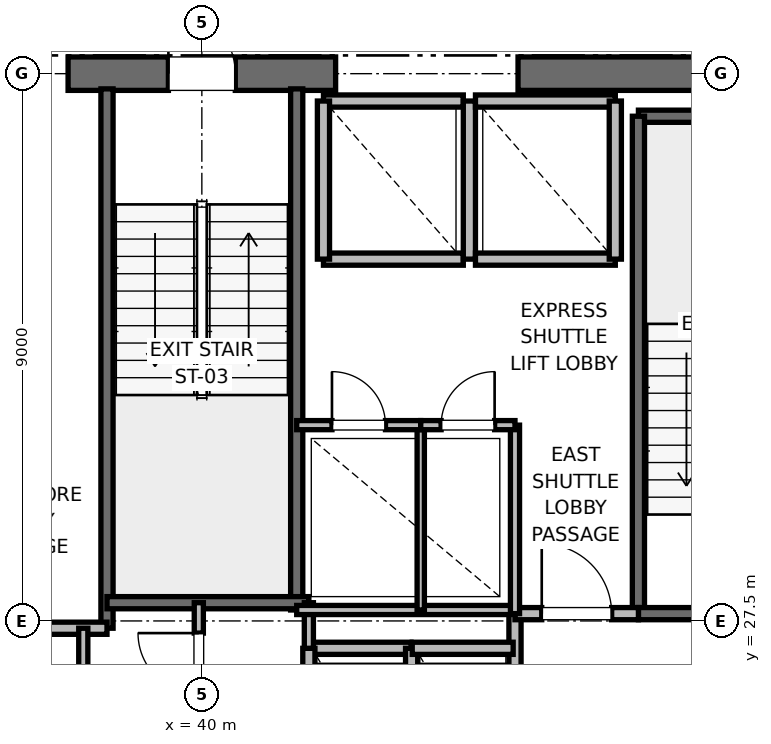
"""IFC4 building model, lengths in metres.
Left out: names, types, materials, properties, quantities, classifications, styles, units other than length and angle.
Written with IfcOpenShell. Run it as: python <this file> out.ifc"""

import sys

from ifc_helpers import new_model, si_unit, direction, frame, frame_2d, origin, place, context, subcontext, project, spatial, rectangle, extrude, element, fill, save


model = new_model("IFC4")
c1 = context("Model", 3, precision=1e-05, world=origin(), true_north=direction((0.0, 1.0)))
c2 = subcontext(c1, "Body", "Model", "MODEL_VIEW")
j1 = project(units=[si_unit("LENGTHUNIT", "METRE"), si_unit("PLANEANGLEUNIT", "RADIAN")], contexts=[c1])
p1 = place(None, origin())
s1 = spatial("IfcSite", under=j1, at=p1, CompositionType="ELEMENT")
p2 = place(p1, origin())
s2 = spatial("IfcBuilding", under=s1, at=p2, CompositionType="ELEMENT")
p3 = place(p2, frame((0.0, 0.0, 221.2)))
s3 = spatial("IfcBuildingStorey", under=s2, at=p3, CompositionType="ELEMENT", Elevation=221.2)
p4 = place(p3, frame((37.8, 36.5, 0.0), z_axis=(0.0, 0.0, 1.0), x_axis=(1.0, 0.0, 0.0)))
e1 = element("IfcWall", 1, at=p4, inside=s3, PredefinedType="SHEAR", context=c2, shape_type="SweptSolid", body=[
    extrude(rectangle(XDim=4.4, YDim=0.55, at=frame_2d((2.2, 0.0))), origin(), (0.0, 0.0, 1.0), 3.775),
])
p5 = place(p4, frame((1.65, 0.0, 0.0)))
e2 = element("IfcOpeningElement", 2, at=p5, cuts=e1, PredefinedType="OPENING", context=c2, shape_type="SweptSolid", body=[
    extrude(rectangle(XDim=1.1, YDim=2.15, at=frame_2d((0.55, 1.075))), frame((0.0, 0.275, 0.0), z_axis=(0.0, -1.0, 0.0), x_axis=(1.0, 0.0, 0.0)), (0.0, 0.0, 1.0), 0.55),
])
p6 = place(p3, frame((45.2, 36.5, 0.0), z_axis=(0.0, 0.0, 1.0), x_axis=(1.0, 0.0, 0.0)))
e3 = element("IfcWall", 3, at=p6, inside=s3, PredefinedType="SHEAR", context=c2, shape_type="SweptSolid", body=[
    extrude(rectangle(XDim=5.8, YDim=0.55, at=frame_2d((2.9, 0.0))), origin(), (0.0, 0.0, 1.0), 3.775),
])
p7 = place(p3, frame((47.18, 35.8, 0.0), z_axis=(0.0, 0.0, 1.0), x_axis=(1.0, 0.0, 0.0)))
e4 = element("IfcWall", 4, at=p7, inside=s3, PredefinedType="SOLIDWALL", context=c2, shape_type="SweptSolid", body=[
    extrude(rectangle(XDim=3.12, YDim=0.2, at=frame_2d((1.56, 0.0))), origin(), (0.0, 0.0, 1.0), 3.775),
])
p8 = place(p3, frame((47.18, 27.62, 0.0), z_axis=(0.0, 0.0, 1.0), x_axis=(0.0, 1.0, 0.0)))
e5 = element("IfcWall", 5, at=p8, inside=s3, PredefinedType="SOLIDWALL", context=c2, shape_type="SweptSolid", body=[
    extrude(rectangle(XDim=8.18, YDim=0.2, at=frame_2d((4.09, 0.0))), origin(), (0.0, 0.0, 1.0), 3.775),
])
p9 = place(p3, frame((47.18, 27.62, 0.0), z_axis=(0.0, 0.0, 1.0), x_axis=(1.0, 0.0, 0.0)))
e6 = element("IfcWall", 6, at=p9, inside=s3, PredefinedType="SOLIDWALL", context=c2, shape_type="SweptSolid", body=[
    extrude(rectangle(XDim=3.12, YDim=0.2, at=frame_2d((1.56, 0.0))), origin(), (0.0, 0.0, 1.0), 3.775),
])
p10 = place(p9, frame((1.01, 0.0, 0.0)))
e7 = element("IfcOpeningElement", 7, at=p10, cuts=e6, PredefinedType="OPENING", context=c2, shape_type="SweptSolid", body=[
    extrude(rectangle(XDim=1.1, YDim=2.15, at=frame_2d((0.55, 1.075))), frame((0.0, 0.1, 0.0), z_axis=(0.0, -1.0, 0.0), x_axis=(1.0, 0.0, 0.0)), (0.0, 0.0, 1.0), 0.2),
])
p11 = place(p3, frame((38.44, 27.38, 0.0), z_axis=(0.0, 0.0, 1.0), x_axis=(0.0, 1.0, 0.0)))
e8 = element("IfcWall", 8, at=p11, inside=s3, PredefinedType="SOLIDWALL", context=c2, shape_type="SweptSolid", body=[
    extrude(rectangle(XDim=8.87, YDim=0.2, at=frame_2d((4.435, 0.0))), origin(), (0.0, 0.0, 1.0), 3.775),
])
p12 = place(p3, frame((41.56, 27.68, 0.0), z_axis=(0.0, 0.0, 1.0), x_axis=(0.0, 1.0, 0.0)))
e9 = element("IfcWall", 9, at=p12, inside=s3, PredefinedType="SOLIDWALL", context=c2, shape_type="SweptSolid", body=[
    extrude(rectangle(XDim=8.57, YDim=0.2, at=frame_2d((4.285, 0.0))), origin(), (0.0, 0.0, 1.0), 3.775),
])
p13 = place(p3, frame((38.44, 27.8, 0.0), z_axis=(0.0, 0.0, 1.0), x_axis=(1.0, 0.0, 0.0)))
e10 = element("IfcWall", 10, at=p13, inside=s3, PredefinedType="SOLIDWALL", context=c2, shape_type="SweptSolid", body=[
    extrude(rectangle(XDim=3.32, YDim=0.2, at=frame_2d((1.66, 0.0))), origin(), (0.0, 0.0, 1.0), 3.775),
])
p14 = place(p3, frame((32.82, 27.38, 0.0), z_axis=(0.0, 0.0, 1.0), x_axis=(1.0, 0.0, 0.0)))
e11 = element("IfcWall", 11, at=p14, inside=s3, PredefinedType="PARTITIONING", context=c2, shape_type="SweptSolid", body=[
    extrude(rectangle(XDim=5.62, YDim=0.2, at=frame_2d((2.81, 0.0))), origin(), (0.0, 0.0, 1.0), 3.775),
])
p15 = place(p3, frame((45.15, 24.25, 0.0), z_axis=(0.0, 0.0, 1.0), x_axis=(0.0, 1.0, 0.0)))
e12 = element("IfcWall", 12, at=p15, inside=s3, PredefinedType="PARTITIONING", context=c2, shape_type="SweptSolid", body=[
    extrude(rectangle(XDim=3.37, YDim=0.2, at=frame_2d((1.685, 0.0))), origin(), (0.0, 0.0, 1.0), 3.775),
])
p16 = place(p3, frame((45.15, 27.62, 0.0), z_axis=(0.0, 0.0, 1.0), x_axis=(1.0, 0.0, 0.0)))
e13 = element("IfcWall", 13, at=p16, inside=s3, PredefinedType="PARTITIONING", context=c2, shape_type="SweptSolid", body=[
    extrude(rectangle(XDim=2.03, YDim=0.2, at=frame_2d((1.015, 0.0))), origin(), (0.0, 0.0, 1.0), 3.775),
])
p17 = place(p16, frame((0.44, 0.0, 0.0)))
e14 = element("IfcOpeningElement", 14, at=p17, cuts=e13, PredefinedType="OPENING", context=c2, shape_type="SweptSolid", body=[
    extrude(rectangle(XDim=1.15, YDim=2.2, at=frame_2d((0.575, 1.1))), frame((0.0, 0.1, 0.0), z_axis=(0.0, -1.0, 0.0), x_axis=(1.0, 0.0, 0.0)), (0.0, 0.0, 1.0), 0.2),
])
p18 = place(p3, frame((43.44, 27.05, 0.0), z_axis=(0.0, 0.0, 1.0), x_axis=(-1.0, 0.0, 0.0)))
e15 = element("IfcWall", 15, at=p18, inside=s3, PredefinedType="SOLIDWALL", context=c2, shape_type="SweptSolid", body=[
    extrude(rectangle(XDim=1.68, YDim=0.2, at=frame_2d((0.84, 0.0))), origin(), (0.0, 0.0, 1.0), 3.775),
])
for number, where, z_axis, x_axis in (
    (16, (41.76, 27.05, 0.0), (0.0, 0.0, 1.0), (0.0, -1.0, 0.0)),
    (17, (43.45, 24.45, 0.0), (0.0, 0.0, 1.0), (0.0, 1.0, 0.0)),
):
    element("IfcWall", number, at=place(p3, frame(where, z_axis=z_axis, x_axis=x_axis)), inside=s3, PredefinedType="SOLIDWALL", context=c2, shape_type="SweptSolid", body=[
        extrude(rectangle(XDim=2.6, YDim=0.2, at=frame_2d((1.3, 0.0))), origin(), (0.0, 0.0, 1.0), 3.775),
    ])
p19 = place(p3, frame((45.12, 27.05, 0.0), z_axis=(0.0, 0.0, 1.0), x_axis=(-1.0, 0.0, 0.0)))
e18 = element("IfcWall", 18, at=p19, inside=s3, PredefinedType="SOLIDWALL", context=c2, shape_type="SweptSolid", body=[
    extrude(rectangle(XDim=1.66, YDim=0.2, at=frame_2d((0.83, 0.0))), origin(), (0.0, 0.0, 1.0), 3.775),
])
p20 = place(p3, frame((42.0, 33.45, 0.0), z_axis=(0.0, 0.0, 1.0), x_axis=(1.0, 0.0, 0.0)))
e19 = element("IfcWall", 19, at=p20, inside=s3, PredefinedType="SOLIDWALL", context=c2, shape_type="SweptSolid", body=[
    extrude(rectangle(XDim=2.3, YDim=0.2, at=frame_2d((1.15, 0.0))), origin(), (0.0, 0.0, 1.0), 3.775),
])
p21 = place(p3, frame((44.3, 36.05, 0.0), z_axis=(0.0, 0.0, 1.0), x_axis=(-1.0, 0.0, 0.0)))
e20 = element("IfcWall", 20, at=p21, inside=s3, PredefinedType="SOLIDWALL", context=c2, shape_type="SweptSolid", body=[
    extrude(rectangle(XDim=2.3, YDim=0.2, at=frame_2d((1.15, 0.0))), origin(), (0.0, 0.0, 1.0), 2.755),
])
for number, where, z_axis, x_axis in (
    (21, (42.0, 36.05, 0.0), (0.0, 0.0, 1.0), (0.0, -1.0, 0.0)),
    (22, (44.4, 33.45, 0.0), (0.0, 0.0, 1.0), (0.0, 1.0, 0.0)),
):
    element("IfcWall", number, at=place(p3, frame(where, z_axis=z_axis, x_axis=x_axis)), inside=s3, PredefinedType="SOLIDWALL", context=c2, shape_type="SweptSolid", body=[
        extrude(rectangle(XDim=2.6, YDim=0.2, at=frame_2d((1.3, 0.0))), origin(), (0.0, 0.0, 1.0), 2.755),
    ])
p22 = place(p3, frame((44.5, 33.45, 0.0), z_axis=(0.0, 0.0, 1.0), x_axis=(1.0, 0.0, 0.0)))
e23 = element("IfcWall", 23, at=p22, inside=s3, PredefinedType="SOLIDWALL", context=c2, shape_type="SweptSolid", body=[
    extrude(rectangle(XDim=2.3, YDim=0.2, at=frame_2d((1.15, 0.0))), origin(), (0.0, 0.0, 1.0), 3.775),
])
p23 = place(p3, frame((46.8, 36.05, 0.0), z_axis=(0.0, 0.0, 1.0), x_axis=(-1.0, 0.0, 0.0)))
e24 = element("IfcWall", 24, at=p23, inside=s3, PredefinedType="SOLIDWALL", context=c2, shape_type="SweptSolid", body=[
    extrude(rectangle(XDim=2.3, YDim=0.2, at=frame_2d((1.15, 0.0))), origin(), (0.0, 0.0, 1.0), 2.755),
])
p24 = place(p3, frame((46.8, 33.45, 0.0), z_axis=(0.0, 0.0, 1.0), x_axis=(0.0, 1.0, 0.0)))
e25 = element("IfcWall", 25, at=p24, inside=s3, PredefinedType="SOLIDWALL", context=c2, shape_type="SweptSolid", body=[
    extrude(rectangle(XDim=2.6, YDim=0.2, at=frame_2d((1.3, 0.0))), origin(), (0.0, 0.0, 1.0), 3.775),
])
p25 = place(p3, frame((41.76, 27.05, 0.0), z_axis=(0.0, 0.0, 1.0), x_axis=(0.0, 1.0, 0.0)))
e26 = element("IfcWall", 26, at=p25, inside=s3, PredefinedType="PARTITIONING", context=c2, shape_type="SweptSolid", body=[
    extrude(rectangle(XDim=0.75, YDim=0.15, at=frame_2d((0.375, 0.0))), origin(), (0.0, 0.0, 1.0), 2.85),
])
p26 = place(p3, frame((39.95, 25.8, 0.0), z_axis=(0.0, 0.0, 1.0), x_axis=(0.0, 1.0, 0.0)))
e27 = element("IfcWall", 27, at=p26, inside=s3, PredefinedType="PARTITIONING", context=c2, shape_type="SweptSolid", body=[
    extrude(rectangle(XDim=2.0, YDim=0.15, at=frame_2d((1.0, 0.0))), origin(), (0.0, 0.0, 1.0), 2.85),
])
p27 = place(p26, frame((0.5, 0.0, 0.0)))
e28 = element("IfcOpeningElement", 28, at=p27, cuts=e27, PredefinedType="OPENING", context=c2, shape_type="SweptSolid", body=[
    extrude(rectangle(XDim=1.0, YDim=2.15, at=frame_2d((0.5, 1.075))), frame((0.0, 0.075, 0.0), z_axis=(0.0, -1.0, 0.0), x_axis=(1.0, 0.0, 0.0)), (0.0, 0.0, 1.0), 0.15),
])
p28 = place(p3, frame((38.05, 24.5, 0.0), z_axis=(0.0, 0.0, 1.0), x_axis=(0.0, 1.0, 0.0)))
e29 = element("IfcWall", 29, at=p28, inside=s3, PredefinedType="PARTITIONING", context=c2, shape_type="SweptSolid", body=[
    extrude(rectangle(XDim=2.88, YDim=0.15, at=frame_2d((1.44, 0.0))), origin(), (0.0, 0.0, 1.0), 2.85),
])
p29 = place(p28, frame((0.94, 0.0, 0.0)))
e30 = element("IfcOpeningElement", 30, at=p29, cuts=e29, PredefinedType="OPENING", context=c2, shape_type="SweptSolid", body=[
    extrude(rectangle(XDim=1.0, YDim=2.15, at=frame_2d((0.5, 1.075))), frame((0.0, 0.075, 0.0), z_axis=(0.0, -1.0, 0.0), x_axis=(1.0, 0.0, 0.0)), (0.0, 0.0, 1.0), 0.15),
])
p30 = place(p3, frame((41.56, 27.68, 0.0), z_axis=(0.0, 0.0, 1.0), x_axis=(1.0, 0.0, 0.0)))
e31 = element("IfcWall", 31, at=p30, inside=s3, PredefinedType="PARTITIONING", context=c2, shape_type="SweptSolid", body=[
    extrude(rectangle(XDim=3.59, YDim=0.15, at=frame_2d((1.795, 0.0))), origin(), (0.0, 0.0, 1.0), 2.85),
])
p31 = place(p3, frame((45.15, 27.62, 0.0), z_axis=(0.0, 0.0, 1.0), x_axis=(0.0, 1.0, 0.0)))
e32 = element("IfcWall", 32, at=p31, inside=s3, PredefinedType="PARTITIONING", context=c2, shape_type="SweptSolid", body=[
    extrude(rectangle(XDim=3.1, YDim=0.15, at=frame_2d((1.55, 0.0))), origin(), (0.0, 0.0, 1.0), 2.85),
])
p32 = place(p3, frame((43.6, 27.68, 0.0), z_axis=(0.0, 0.0, 1.0), x_axis=(0.0, 1.0, 0.0)))
e33 = element("IfcWall", 33, at=p32, inside=s3, PredefinedType="PARTITIONING", context=c2, shape_type="SweptSolid", body=[
    extrude(rectangle(XDim=3.04, YDim=0.12, at=frame_2d((1.52, 0.0))), origin(), (0.0, 0.0, 1.0), 2.85),
])
p33 = place(p3, frame((41.56, 30.72, 0.0), z_axis=(0.0, 0.0, 1.0), x_axis=(1.0, 0.0, 0.0)))
e34 = element("IfcWall", 34, at=p33, inside=s3, PredefinedType="PARTITIONING", context=c2, shape_type="SweptSolid", body=[
    extrude(rectangle(XDim=2.04, YDim=0.15, at=frame_2d((1.02, 0.0))), origin(), (0.0, 0.0, 1.0), 2.85),
])
p34 = place(p33, frame((0.58, 0.0, 0.0)))
e35 = element("IfcOpeningElement", 35, at=p34, cuts=e34, PredefinedType="OPENING", context=c2, shape_type="SweptSolid", body=[
    extrude(rectangle(XDim=0.88, YDim=2.1, at=frame_2d((0.44, 1.05))), frame((0.0, 0.075, 0.0), z_axis=(0.0, -1.0, 0.0), x_axis=(1.0, 0.0, 0.0)), (0.0, 0.0, 1.0), 0.15),
])
p35 = place(p3, frame((43.6, 30.72, 0.0), z_axis=(0.0, 0.0, 1.0), x_axis=(1.0, 0.0, 0.0)))
e36 = element("IfcWall", 36, at=p35, inside=s3, PredefinedType="PARTITIONING", context=c2, shape_type="SweptSolid", body=[
    extrude(rectangle(XDim=1.55, YDim=0.15, at=frame_2d((0.775, 0.0))), origin(), (0.0, 0.0, 1.0), 2.85),
])
p36 = place(p35, frame((0.335, 0.0, 0.0)))
e37 = element("IfcOpeningElement", 37, at=p36, cuts=e36, PredefinedType="OPENING", context=c2, shape_type="SweptSolid", body=[
    extrude(rectangle(XDim=0.88, YDim=2.1, at=frame_2d((0.44, 1.05))), frame((0.0, 0.075, 0.0), z_axis=(0.0, -1.0, 0.0), x_axis=(1.0, 0.0, 0.0)), (0.0, 0.0, 1.0), 0.15),
])
p37 = place(p5, origin())
e38 = element("IfcDoor", 38, at=p37, inside=s3, OperationType="SINGLE_SWING_LEFT", PredefinedType="DOOR", context=c2, shape_type="SweptSolid", body=[
    extrude(rectangle(XDim=1.1, YDim=2.15, at=frame_2d((0.55, 1.075))), frame((0.0, 0.025, 0.0), z_axis=(0.0, -1.0, 0.0), x_axis=(1.0, 0.0, 0.0)), (0.0, 0.0, 1.0), 0.05),
])
fill(e2, e38)
p38 = place(p17, origin())
e39 = element("IfcDoor", 39, at=p38, inside=s3, OperationType="SINGLE_SWING_LEFT", PredefinedType="DOOR", context=c2, shape_type="SweptSolid", body=[
    extrude(rectangle(XDim=1.15, YDim=2.2, at=frame_2d((0.575, 1.1))), frame((0.0, 0.025, 0.0), z_axis=(0.0, -1.0, 0.0), x_axis=(1.0, 0.0, 0.0)), (0.0, 0.0, 1.0), 0.05),
])
fill(e14, e39)
p39 = place(p27, origin())
e40 = element("IfcDoor", 40, at=p39, inside=s3, OperationType="SINGLE_SWING_RIGHT", PredefinedType="DOOR", context=c2, shape_type="SweptSolid", body=[
    extrude(rectangle(XDim=1.0, YDim=2.15, at=frame_2d((0.5, 1.075))), frame((0.0, 0.025, 0.0), z_axis=(0.0, -1.0, 0.0), x_axis=(1.0, 0.0, 0.0)), (0.0, 0.0, 1.0), 0.05),
])
fill(e28, e40)
p40 = place(p34, origin())
e41 = element("IfcDoor", 41, at=p40, inside=s3, OperationType="SINGLE_SWING_LEFT", PredefinedType="DOOR", context=c2, shape_type="SweptSolid", body=[
    extrude(rectangle(XDim=0.88, YDim=2.1, at=frame_2d((0.44, 1.05))), frame((0.0, 0.025, 0.0), z_axis=(0.0, -1.0, 0.0), x_axis=(1.0, 0.0, 0.0)), (0.0, 0.0, 1.0), 0.05),
])
fill(e35, e41)
p41 = place(p36, origin())
e42 = element("IfcDoor", 42, at=p41, inside=s3, OperationType="SINGLE_SWING_RIGHT", PredefinedType="DOOR", context=c2, shape_type="SweptSolid", body=[
    extrude(rectangle(XDim=0.88, YDim=2.1, at=frame_2d((0.44, 1.05))), frame((0.0, 0.025, 0.0), z_axis=(0.0, -1.0, 0.0), x_axis=(1.0, 0.0, 0.0)), (0.0, 0.0, 1.0), 0.05),
])
fill(e37, e42)
save(model, sys.argv[1])
